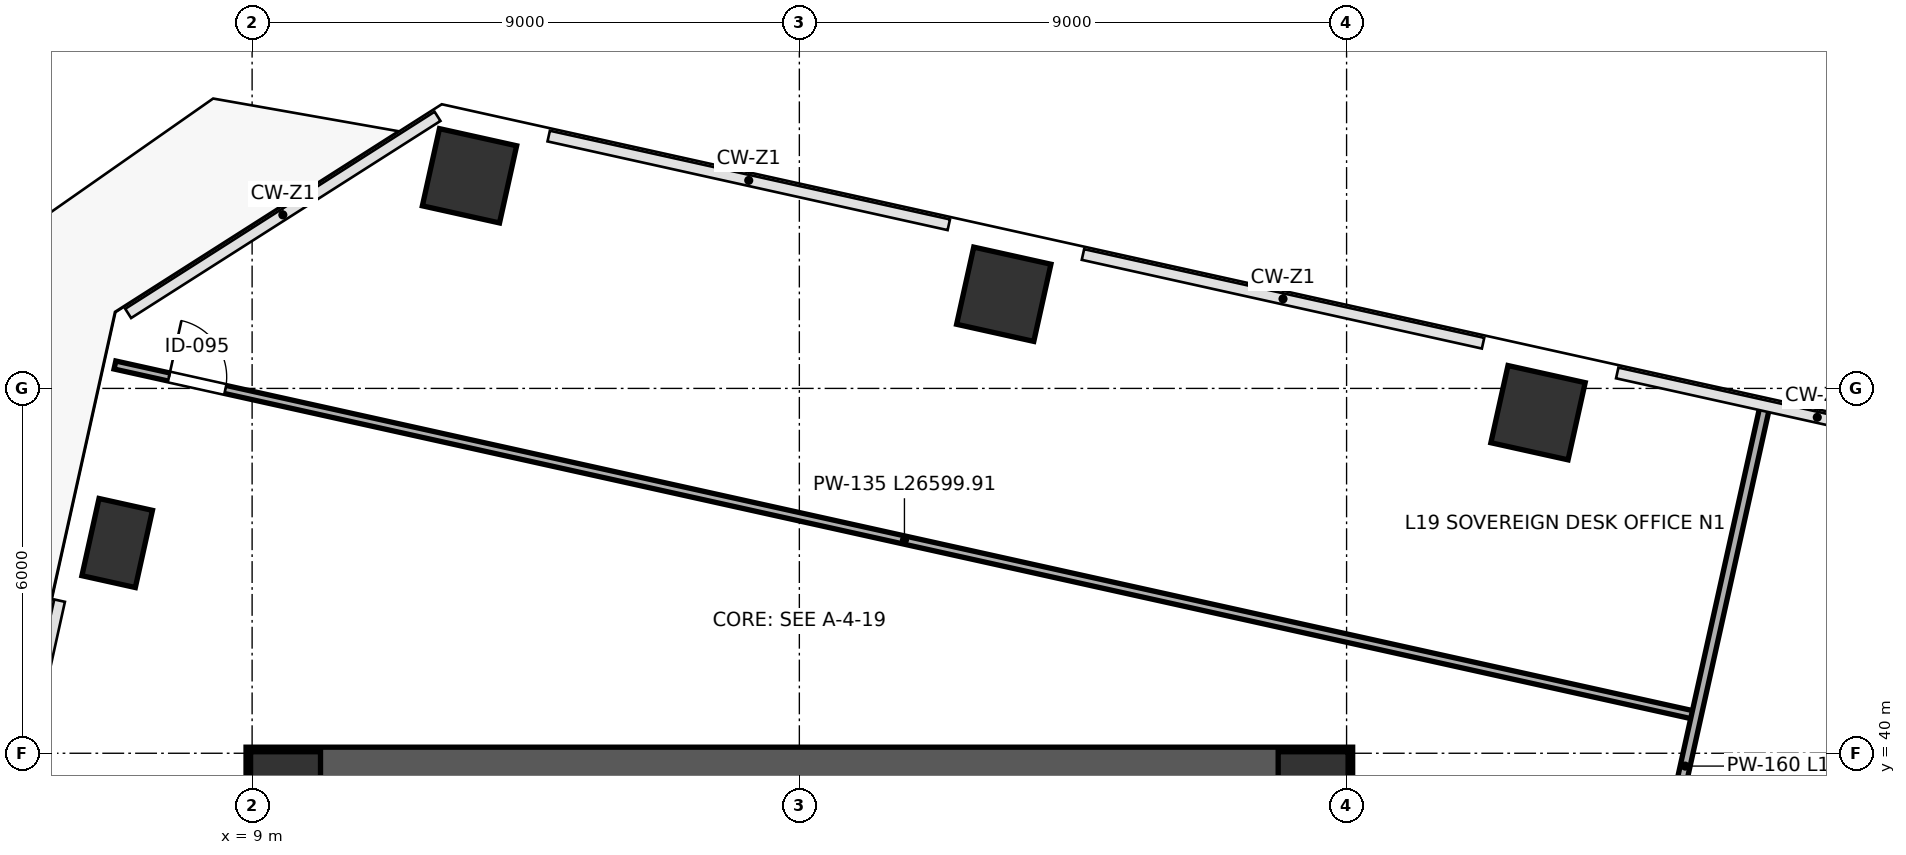
"""IFC4 building model, lengths in metres.
Left out: names, types, materials, properties, quantities, classifications, styles, units other than length and angle.
Written with IfcOpenShell. Run it as: python <this file> out.ifc"""

import sys

from ifc_helpers import new_model, si_unit, direction, frame, frame_2d, origin, origin_2d, place, context, subcontext, project, spatial, rectangle, extrude, source, transform, mapped, element, fill, save


model = new_model("IFC4")
c1 = context("Model", 3, precision=1e-05, world=origin(), true_north=direction((0.0, 1.0)))
c2 = subcontext(c1, "Body", "Model", "MODEL_VIEW")
j1 = project(units=[si_unit("LENGTHUNIT", "METRE"), si_unit("PLANEANGLEUNIT", "RADIAN")], contexts=[c1])
p1 = place(None, origin())
s1 = spatial("IfcSite", under=j1, at=p1, CompositionType="ELEMENT")
p2 = place(p1, origin())
s2 = spatial("IfcBuilding", under=s1, at=p2, CompositionType="ELEMENT")
p3 = place(p2, frame((0.0, 0.0, 87.4)))
s3 = spatial("IfcBuildingStorey", under=s2, at=p3, CompositionType="ELEMENT", Elevation=87.4)
m1 = source(origin(), c2, "Body", "SweptSolid", [
    extrude(rectangle(XDim=1.15, YDim=1.15, at=origin_2d()), origin(), (0.0, 0.0, 1.0), 4.199),
])
for number, where, z_axis, x_axis in (
    (1, (9.55, 39.45, 0.001), (0.0, 0.0, 1.0), (1.0, 0.0, 0.0)),
    (2, (26.45, 39.45, 0.001), (0.0, 0.0, 1.0), (1.0, 0.0, 0.0)),
):
    element("IfcColumn", number, at=place(p3, frame(where, z_axis=z_axis, x_axis=x_axis)), inside=s3, PredefinedType="COLUMN", context=c2, shape_type="MappedRepresentation", body=[
        mapped(m1, transform((0.0, 0.0, 0.0), scale=1.0)),
    ])
m2 = source(origin(), c2, "Body", "SweptSolid", [
    extrude(rectangle(XDim=1.3, YDim=1.3, at=origin_2d()), origin(), (0.0, 0.0, 1.0), 4.199),
])
for number, where, z_axis, x_axis in (
    (3, (12.575, 49.496, 0.001), (0.0, 0.0, 1.0), (-0.976, 0.216, 0.0)),
    (4, (21.362, 47.548, 0.001), (0.0, 0.0, 1.0), (-0.976, 0.216, 0.0)),
    (5, (30.149, 45.601, 0.001), (0.0, 0.0, 1.0), (-0.976, 0.216, 0.0)),
):
    element("IfcColumn", number, at=place(p3, frame(where, z_axis=z_axis, x_axis=x_axis)), inside=s3, PredefinedType="COLUMN", context=c2, shape_type="MappedRepresentation", body=[
        mapped(m2, transform((0.0, 0.0, 0.0), scale=1.0)),
    ])
m3 = source(origin(), c2, "Body", "SweptSolid", [
    extrude(rectangle(XDim=0.9, YDim=1.3, at=origin_2d()), origin(), (0.0, 0.0, 1.0), 4.199),
])
p4 = place(p3, frame((6.781, 43.458, 0.001), z_axis=(0.0, 0.0, 1.0), x_axis=(-0.97629600712, 0.216439613938, 0.0)))
e6 = element("IfcColumn", 6, at=p4, inside=s3, PredefinedType="PILASTER", context=c2, shape_type="MappedRepresentation", body=[
    mapped(m3, transform((0.0, 0.0, 0.0), scale=1.0)),
])
p5 = place(p3, frame((8.9, 39.825, 0.0), z_axis=(0.0, 0.0, 1.0), x_axis=(1.0, 0.0, 0.0)))
e7 = element("IfcWall", 7, at=p5, inside=s3, PredefinedType="SHEAR", context=c2, shape_type="SweptSolid", body=[
    extrude(rectangle(XDim=18.2, YDim=0.55, at=frame_2d((9.1, 0.0))), origin(), (0.0, 0.0, 1.0), 3.96),
])
p6 = place(p3, frame((6.744, 46.385, 0.0), z_axis=(0.0, 0.0, 1.0), x_axis=(0.976297719541, -0.216431889561, 0.0)))
e8 = element("IfcWall", 8, at=p6, inside=s3, PredefinedType="PARTITIONING", context=c2, shape_type="SweptSolid", body=[
    extrude(rectangle(XDim=26.6, YDim=0.135, at=frame_2d((13.3, 0.0))), origin(), (0.0, 0.0, 1.0), 3.96),
])
p7 = place(p6, frame((0.91, 0.0, 0.0)))
e9 = element("IfcOpeningElement", 9, at=p7, cuts=e8, PredefinedType="OPENING", context=c2, shape_type="SweptSolid", body=[
    extrude(rectangle(XDim=0.95, YDim=2.15, at=frame_2d((0.475, 1.075))), frame((0.0, 0.078, 0.0), z_axis=(0.0, -1.0, 0.0), x_axis=(1.0, 0.0, 0.0)), (0.0, 0.0, 1.0), 0.155),
])
p8 = place(p3, frame((31.265, 33.912, 0.0), z_axis=(0.0, 0.0, 1.0), x_axis=(0.216425867349, 0.976299054564, 0.0)))
e10 = element("IfcWall", 10, at=p8, inside=s3, PredefinedType="PARTITIONING", context=c2, shape_type="SweptSolid", body=[
    extrude(rectangle(XDim=12.04, YDim=0.16, at=frame_2d((6.02, 0.0))), origin(), (0.0, 0.0, 1.0), 3.095),
])
m4 = source(origin(), c2, "Body", "SweptSolid", [
    extrude(rectangle(XDim=0.95, YDim=2.15, at=frame_2d((0.475, 1.075))), frame((0.0, 0.025, 0.0), z_axis=(0.0, -1.0, 0.0), x_axis=(1.0, 0.0, 0.0)), (0.0, 0.0, 1.0), 0.05),
])
p9 = place(p7, origin())
e11 = element("IfcDoor", 11, at=p9, inside=s3, OperationType="SINGLE_SWING_LEFT", PredefinedType="DOOR", context=c2, shape_type="MappedRepresentation", body=[
    mapped(m4, transform((0.0, 0.0, 0.0), scale=1.0)),
])
fill(e9, e11)
save(model, sys.argv[1])
